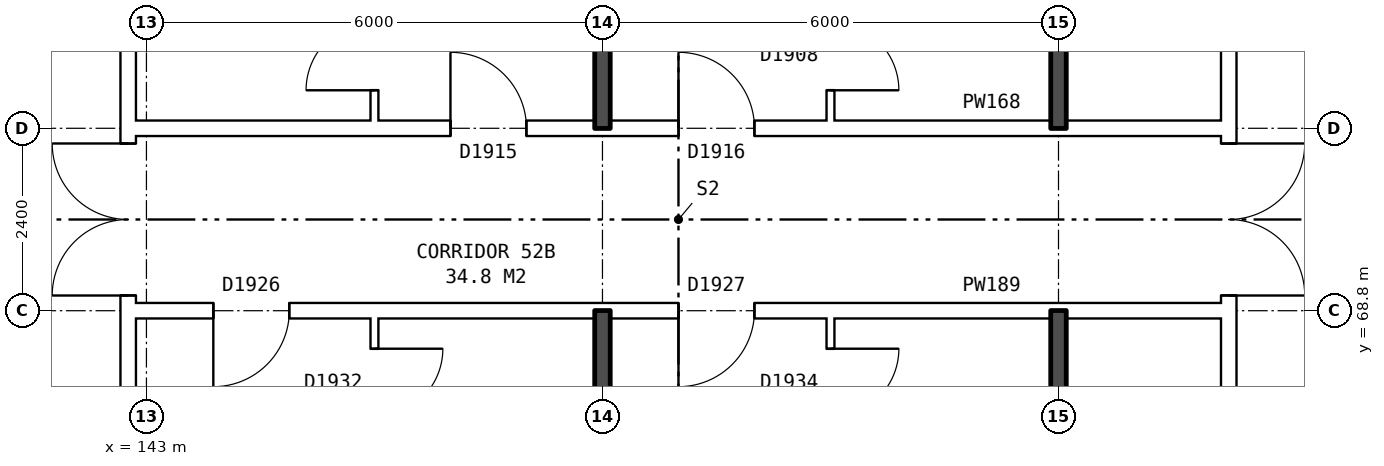
"""IFC4 building model, lengths in metres.
Left out: names, types, materials, properties, quantities, classifications, styles, units other than length and angle.
Written with IfcOpenShell. Run it as: python <this file> out.ifc"""

import sys

from ifc_helpers import new_model, si_unit, direction, frame, frame_2d, origin, place, context, subcontext, project, spatial, rectangle, extrude, element, fill, save


model = new_model("IFC4")
c1 = context("Model", 3, precision=1e-05, world=origin(), true_north=direction((0.0, 1.0)))
c2 = subcontext(c1, "Body", "Model", "MODEL_VIEW")
j1 = project(units=[si_unit("LENGTHUNIT", "METRE"), si_unit("PLANEANGLEUNIT", "RADIAN")], contexts=[c1])
p1 = place(None, origin())
s1 = spatial("IfcSite", under=j1, at=p1, CompositionType="ELEMENT")
p2 = place(p1, origin())
s2 = spatial("IfcBuilding", under=s1, at=p2, CompositionType="ELEMENT")
p3 = place(p2, frame((0.0, 0.0, 185.1)))
s3 = spatial("IfcBuildingStorey", under=s2, at=p3, CompositionType="ELEMENT", Elevation=185.1)
p4 = place(p3, frame((142.76, 63.9, 0.0), z_axis=(0.0, 0.0, 1.0), x_axis=(0.0, 1.0, 0.0)))
e1 = element("IfcWall", 1, at=p4, inside=s3, PredefinedType="PARTITIONING", context=c2, shape_type="SweptSolid", body=[
    extrude(rectangle(XDim=12.2, YDim=0.2, at=frame_2d((6.1, 0.0))), origin(), (0.0, 0.0, 1.0), 2.85),
])
p5 = place(p4, frame((5.1, 0.0, 0.0)))
e2 = element("IfcOpeningElement", 2, at=p5, cuts=e1, PredefinedType="OPENING", context=c2, shape_type="SweptSolid", body=[
    extrude(rectangle(XDim=2.0, YDim=2.1, at=frame_2d((1.0, 1.05))), frame((0.0, 0.11, 0.0), z_axis=(0.0, -1.0, 0.0), x_axis=(1.0, 0.0, 0.0)), (0.0, 0.0, 1.0), 0.22),
])
p6 = place(p3, frame((157.24, 63.9, 0.0), z_axis=(0.0, 0.0, 1.0), x_axis=(0.0, 1.0, 0.0)))
e3 = element("IfcWall", 3, at=p6, inside=s3, PredefinedType="PARTITIONING", context=c2, shape_type="SweptSolid", body=[
    extrude(rectangle(XDim=12.2, YDim=0.2, at=frame_2d((6.1, 0.0))), origin(), (0.0, 0.0, 1.0), 2.85),
])
p7 = place(p6, frame((5.1, 0.0, 0.0)))
e4 = element("IfcOpeningElement", 4, at=p7, cuts=e3, PredefinedType="OPENING", context=c2, shape_type="SweptSolid", body=[
    extrude(rectangle(XDim=2.0, YDim=2.1, at=frame_2d((1.0, 1.05))), frame((0.0, 0.11, 0.0), z_axis=(0.0, -1.0, 0.0), x_axis=(1.0, 0.0, 0.0)), (0.0, 0.0, 1.0), 0.22),
])
p8 = place(p3, frame((142.76, 68.8, 0.0), z_axis=(0.0, 0.0, 1.0), x_axis=(1.0, 0.0, 0.0)))
e5 = element("IfcWall", 5, at=p8, inside=s3, PredefinedType="PARTITIONING", context=c2, shape_type="SweptSolid", body=[
    extrude(rectangle(XDim=14.48, YDim=0.2, at=frame_2d((7.24, 0.0))), origin(), (0.0, 0.0, 1.0), 2.85),
])
p9 = place(p8, frame((1.12, 0.0, 0.0)))
e6 = element("IfcOpeningElement", 6, at=p9, cuts=e5, PredefinedType="OPENING", context=c2, shape_type="SweptSolid", body=[
    extrude(rectangle(XDim=1.0, YDim=2.1, at=frame_2d((0.5, 1.05))), frame((0.0, 0.11, 0.0), z_axis=(0.0, -1.0, 0.0), x_axis=(1.0, 0.0, 0.0)), (0.0, 0.0, 1.0), 0.22),
])
p10 = place(p8, frame((7.24, 0.0, 0.0)))
e7 = element("IfcOpeningElement", 7, at=p10, cuts=e5, PredefinedType="OPENING", context=c2, shape_type="SweptSolid", body=[
    extrude(rectangle(XDim=1.0, YDim=2.1, at=frame_2d((0.5, 1.05))), frame((0.0, 0.11, 0.0), z_axis=(0.0, -1.0, 0.0), x_axis=(1.0, 0.0, 0.0)), (0.0, 0.0, 1.0), 0.22),
])
p11 = place(p3, frame((142.76, 71.2, 0.0), z_axis=(0.0, 0.0, 1.0), x_axis=(1.0, 0.0, 0.0)))
e8 = element("IfcWall", 8, at=p11, inside=s3, PredefinedType="PARTITIONING", context=c2, shape_type="SweptSolid", body=[
    extrude(rectangle(XDim=14.48, YDim=0.2, at=frame_2d((7.24, 0.0))), origin(), (0.0, 0.0, 1.0), 2.85),
])
p12 = place(p11, frame((4.24, 0.0, 0.0)))
e9 = element("IfcOpeningElement", 9, at=p12, cuts=e8, PredefinedType="OPENING", context=c2, shape_type="SweptSolid", body=[
    extrude(rectangle(XDim=1.0, YDim=2.1, at=frame_2d((0.5, 1.05))), frame((0.0, 0.11, 0.0), z_axis=(0.0, -1.0, 0.0), x_axis=(1.0, 0.0, 0.0)), (0.0, 0.0, 1.0), 0.22),
])
p13 = place(p11, frame((7.24, 0.0, 0.0)))
e10 = element("IfcOpeningElement", 10, at=p13, cuts=e8, PredefinedType="OPENING", context=c2, shape_type="SweptSolid", body=[
    extrude(rectangle(XDim=1.0, YDim=2.1, at=frame_2d((0.5, 1.05))), frame((0.0, 0.11, 0.0), z_axis=(0.0, -1.0, 0.0), x_axis=(1.0, 0.0, 0.0)), (0.0, 0.0, 1.0), 0.22),
])
p14 = place(p3, frame((146.0, 54.36, 0.0), z_axis=(0.0, 0.0, 1.0), x_axis=(0.0, 1.0, 0.0)))
e11 = element("IfcWall", 11, at=p14, inside=s3, PredefinedType="PARTITIONING", context=c2, shape_type="SweptSolid", body=[
    extrude(rectangle(XDim=14.34, YDim=0.1, at=frame_2d((7.17, 0.0))), origin(), (0.0, 0.0, 1.0), 2.85),
])
p15 = place(p14, frame((4.2, 0.0, 0.0)))
e12 = element("IfcOpeningElement", 12, at=p15, cuts=e11, PredefinedType="OPENING", context=c2, shape_type="SweptSolid", body=[
    extrude(rectangle(XDim=0.9, YDim=2.1, at=frame_2d((0.45, 1.05))), frame((0.0, 0.06, 0.0), z_axis=(0.0, -1.0, 0.0), x_axis=(1.0, 0.0, 0.0)), (0.0, 0.0, 1.0), 0.12),
])
p16 = place(p14, frame((13.04, 0.0, 0.0)))
e13 = element("IfcOpeningElement", 13, at=p16, cuts=e11, PredefinedType="OPENING", context=c2, shape_type="SweptSolid", body=[
    extrude(rectangle(XDim=0.9, YDim=2.1, at=frame_2d((0.45, 1.05))), frame((0.0, 0.06, 0.0), z_axis=(0.0, -1.0, 0.0), x_axis=(1.0, 0.0, 0.0)), (0.0, 0.0, 1.0), 0.12),
])
p17 = place(p3, frame((146.0, 71.3, 0.0), z_axis=(0.0, 0.0, 1.0), x_axis=(0.0, 1.0, 0.0)))
e14 = element("IfcWall", 14, at=p17, inside=s3, PredefinedType="PARTITIONING", context=c2, shape_type="SweptSolid", body=[
    extrude(rectangle(XDim=14.34, YDim=0.1, at=frame_2d((7.17, 0.0))), origin(), (0.0, 0.0, 1.0), 2.85),
])
p18 = place(p17, frame((5.74, 0.0, 0.0)))
e15 = element("IfcOpeningElement", 15, at=p18, cuts=e14, PredefinedType="OPENING", context=c2, shape_type="SweptSolid", body=[
    extrude(rectangle(XDim=0.9, YDim=2.1, at=frame_2d((0.45, 1.05))), frame((0.0, 0.06, 0.0), z_axis=(0.0, -1.0, 0.0), x_axis=(1.0, 0.0, 0.0)), (0.0, 0.0, 1.0), 0.12),
])
p19 = place(p17, frame((0.4, 0.0, 0.0)))
e16 = element("IfcOpeningElement", 16, at=p19, cuts=e14, PredefinedType="OPENING", context=c2, shape_type="SweptSolid", body=[
    extrude(rectangle(XDim=0.9, YDim=2.1, at=frame_2d((0.45, 1.05))), frame((0.0, 0.06, 0.0), z_axis=(0.0, -1.0, 0.0), x_axis=(1.0, 0.0, 0.0)), (0.0, 0.0, 1.0), 0.12),
])
for number, where, z_axis, x_axis in (
    (17, (149.0, 54.36, 0.0), (0.0, 0.0, 1.0), (0.0, 1.0, 0.0)),
    (18, (149.0, 71.2, 0.0), (0.0, 0.0, 1.0), (0.0, 1.0, 0.0)),
):
    element("IfcWall", number, at=place(p3, frame(where, z_axis=z_axis, x_axis=x_axis)), inside=s3, PredefinedType="SOLIDWALL", context=c2, shape_type="SweptSolid", body=[
        extrude(rectangle(XDim=14.44, YDim=0.2, at=frame_2d((7.22, 0.0))), origin(), (0.0, 0.0, 1.0), 2.85),
    ])
p20 = place(p3, frame((152.0, 54.36, 0.0), z_axis=(0.0, 0.0, 1.0), x_axis=(0.0, 1.0, 0.0)))
e19 = element("IfcWall", 19, at=p20, inside=s3, PredefinedType="PARTITIONING", context=c2, shape_type="SweptSolid", body=[
    extrude(rectangle(XDim=14.34, YDim=0.1, at=frame_2d((7.17, 0.0))), origin(), (0.0, 0.0, 1.0), 2.85),
])
p21 = place(p20, frame((5.5, 0.0, 0.0)))
e20 = element("IfcOpeningElement", 20, at=p21, cuts=e19, PredefinedType="OPENING", context=c2, shape_type="SweptSolid", body=[
    extrude(rectangle(XDim=0.9, YDim=2.1, at=frame_2d((0.45, 1.05))), frame((0.0, 0.06, 0.0), z_axis=(0.0, -1.0, 0.0), x_axis=(1.0, 0.0, 0.0)), (0.0, 0.0, 1.0), 0.12),
])
p22 = place(p20, frame((13.04, 0.0, 0.0)))
e21 = element("IfcOpeningElement", 21, at=p22, cuts=e19, PredefinedType="OPENING", context=c2, shape_type="SweptSolid", body=[
    extrude(rectangle(XDim=0.9, YDim=2.1, at=frame_2d((0.45, 1.05))), frame((0.0, 0.06, 0.0), z_axis=(0.0, -1.0, 0.0), x_axis=(1.0, 0.0, 0.0)), (0.0, 0.0, 1.0), 0.12),
])
p23 = place(p3, frame((152.0, 71.3, 0.0), z_axis=(0.0, 0.0, 1.0), x_axis=(0.0, 1.0, 0.0)))
e22 = element("IfcWall", 22, at=p23, inside=s3, PredefinedType="PARTITIONING", context=c2, shape_type="SweptSolid", body=[
    extrude(rectangle(XDim=14.34, YDim=0.1, at=frame_2d((7.17, 0.0))), origin(), (0.0, 0.0, 1.0), 2.85),
])
p24 = place(p23, frame((7.94, 0.0, 0.0)))
e23 = element("IfcOpeningElement", 23, at=p24, cuts=e22, PredefinedType="OPENING", context=c2, shape_type="SweptSolid", body=[
    extrude(rectangle(XDim=0.9, YDim=2.1, at=frame_2d((0.45, 1.05))), frame((0.0, 0.06, 0.0), z_axis=(0.0, -1.0, 0.0), x_axis=(1.0, 0.0, 0.0)), (0.0, 0.0, 1.0), 0.12),
])
p25 = place(p23, frame((0.4, 0.0, 0.0)))
e24 = element("IfcOpeningElement", 24, at=p25, cuts=e22, PredefinedType="OPENING", context=c2, shape_type="SweptSolid", body=[
    extrude(rectangle(XDim=0.9, YDim=2.1, at=frame_2d((0.45, 1.05))), frame((0.0, 0.06, 0.0), z_axis=(0.0, -1.0, 0.0), x_axis=(1.0, 0.0, 0.0)), (0.0, 0.0, 1.0), 0.12),
])
for number, where, z_axis, x_axis in (
    (25, (155.0, 63.8, 0.0), (0.0, 0.0, 1.0), (0.0, 1.0, 0.0)),
    (26, (155.0, 71.2, 0.0), (0.0, 0.0, 1.0), (0.0, 1.0, 0.0)),
):
    element("IfcWall", number, at=place(p3, frame(where, z_axis=z_axis, x_axis=x_axis)), inside=s3, PredefinedType="SOLIDWALL", context=c2, shape_type="SweptSolid", body=[
        extrude(rectangle(XDim=5.0, YDim=0.2, at=frame_2d((2.5, 0.0))), origin(), (0.0, 0.0, 1.0), 2.85),
    ])
p26 = place(p5, origin())
e27 = element("IfcDoor", 27, at=p26, inside=s3, OperationType="DOUBLE_DOOR_SINGLE_SWING", PredefinedType="DOOR", context=c2, shape_type="SweptSolid", body=[
    extrude(rectangle(XDim=2.0, YDim=2.1, at=frame_2d((1.0, 1.05))), frame((0.0, 0.025, 0.0), z_axis=(0.0, -1.0, 0.0), x_axis=(1.0, 0.0, 0.0)), (0.0, 0.0, 1.0), 0.05),
])
fill(e2, e27)
p27 = place(p7, frame((2.0, 0.0, 0.0), z_axis=(0.0, 0.0, 1.0), x_axis=(-1.0, 0.0, 0.0)))
e28 = element("IfcDoor", 28, at=p27, inside=s3, OperationType="DOUBLE_DOOR_SINGLE_SWING", PredefinedType="DOOR", context=c2, shape_type="SweptSolid", body=[
    extrude(rectangle(XDim=2.0, YDim=2.1, at=frame_2d((1.0, 1.05))), frame((0.0, 0.025, 0.0), z_axis=(0.0, -1.0, 0.0), x_axis=(1.0, 0.0, 0.0)), (0.0, 0.0, 1.0), 0.05),
])
fill(e4, e28)
p28 = place(p9, frame((1.0, 0.0, 0.0), z_axis=(0.0, 0.0, 1.0), x_axis=(-1.0, 0.0, 0.0)))
e29 = element("IfcDoor", 29, at=p28, inside=s3, OperationType="SINGLE_SWING_RIGHT", PredefinedType="DOOR", context=c2, shape_type="SweptSolid", body=[
    extrude(rectangle(XDim=1.0, YDim=2.1, at=frame_2d((0.5, 1.05))), frame((0.0, 0.025, 0.0), z_axis=(0.0, -1.0, 0.0), x_axis=(1.0, 0.0, 0.0)), (0.0, 0.0, 1.0), 0.05),
])
fill(e6, e29)
p29 = place(p16, frame((0.9, 0.0, 0.0), z_axis=(0.0, 0.0, 1.0), x_axis=(-1.0, 0.0, 0.0)))
e30 = element("IfcDoor", 30, at=p29, inside=s3, OperationType="SINGLE_SWING_LEFT", PredefinedType="DOOR", context=c2, shape_type="SweptSolid", body=[
    extrude(rectangle(XDim=0.9, YDim=2.1, at=frame_2d((0.45, 1.05))), frame((0.0, 0.025, 0.0), z_axis=(0.0, -1.0, 0.0), x_axis=(1.0, 0.0, 0.0)), (0.0, 0.0, 1.0), 0.05),
])
fill(e13, e30)
p30 = place(p10, frame((1.0, 0.0, 0.0), z_axis=(0.0, 0.0, 1.0), x_axis=(-1.0, 0.0, 0.0)))
e31 = element("IfcDoor", 31, at=p30, inside=s3, OperationType="SINGLE_SWING_RIGHT", PredefinedType="DOOR", context=c2, shape_type="SweptSolid", body=[
    extrude(rectangle(XDim=1.0, YDim=2.1, at=frame_2d((0.5, 1.05))), frame((0.0, 0.025, 0.0), z_axis=(0.0, -1.0, 0.0), x_axis=(1.0, 0.0, 0.0)), (0.0, 0.0, 1.0), 0.05),
])
fill(e7, e31)
p31 = place(p22, frame((0.9, 0.0, 0.0), z_axis=(0.0, 0.0, 1.0), x_axis=(-1.0, 0.0, 0.0)))
e32 = element("IfcDoor", 32, at=p31, inside=s3, OperationType="SINGLE_SWING_LEFT", PredefinedType="DOOR", context=c2, shape_type="SweptSolid", body=[
    extrude(rectangle(XDim=0.9, YDim=2.1, at=frame_2d((0.45, 1.05))), frame((0.0, 0.025, 0.0), z_axis=(0.0, -1.0, 0.0), x_axis=(1.0, 0.0, 0.0)), (0.0, 0.0, 1.0), 0.05),
])
fill(e21, e32)
p32 = place(p12, origin())
e33 = element("IfcDoor", 33, at=p32, inside=s3, OperationType="SINGLE_SWING_LEFT", PredefinedType="DOOR", context=c2, shape_type="SweptSolid", body=[
    extrude(rectangle(XDim=1.0, YDim=2.1, at=frame_2d((0.5, 1.05))), frame((0.0, 0.025, 0.0), z_axis=(0.0, -1.0, 0.0), x_axis=(1.0, 0.0, 0.0)), (0.0, 0.0, 1.0), 0.05),
])
fill(e9, e33)
p33 = place(p19, origin())
e34 = element("IfcDoor", 34, at=p33, inside=s3, OperationType="SINGLE_SWING_LEFT", PredefinedType="DOOR", context=c2, shape_type="SweptSolid", body=[
    extrude(rectangle(XDim=0.9, YDim=2.1, at=frame_2d((0.45, 1.05))), frame((0.0, 0.025, 0.0), z_axis=(0.0, -1.0, 0.0), x_axis=(1.0, 0.0, 0.0)), (0.0, 0.0, 1.0), 0.05),
])
fill(e16, e34)
p34 = place(p13, origin())
e35 = element("IfcDoor", 35, at=p34, inside=s3, OperationType="SINGLE_SWING_LEFT", PredefinedType="DOOR", context=c2, shape_type="SweptSolid", body=[
    extrude(rectangle(XDim=1.0, YDim=2.1, at=frame_2d((0.5, 1.05))), frame((0.0, 0.025, 0.0), z_axis=(0.0, -1.0, 0.0), x_axis=(1.0, 0.0, 0.0)), (0.0, 0.0, 1.0), 0.05),
])
fill(e10, e35)
p35 = place(p25, frame((0.9, 0.0, 0.0), z_axis=(0.0, 0.0, 1.0), x_axis=(-1.0, 0.0, 0.0)))
e36 = element("IfcDoor", 36, at=p35, inside=s3, OperationType="SINGLE_SWING_RIGHT", PredefinedType="DOOR", context=c2, shape_type="SweptSolid", body=[
    extrude(rectangle(XDim=0.9, YDim=2.1, at=frame_2d((0.45, 1.05))), frame((0.0, 0.025, 0.0), z_axis=(0.0, -1.0, 0.0), x_axis=(1.0, 0.0, 0.0)), (0.0, 0.0, 1.0), 0.05),
])
fill(e24, e36)
save(model, sys.argv[1])
